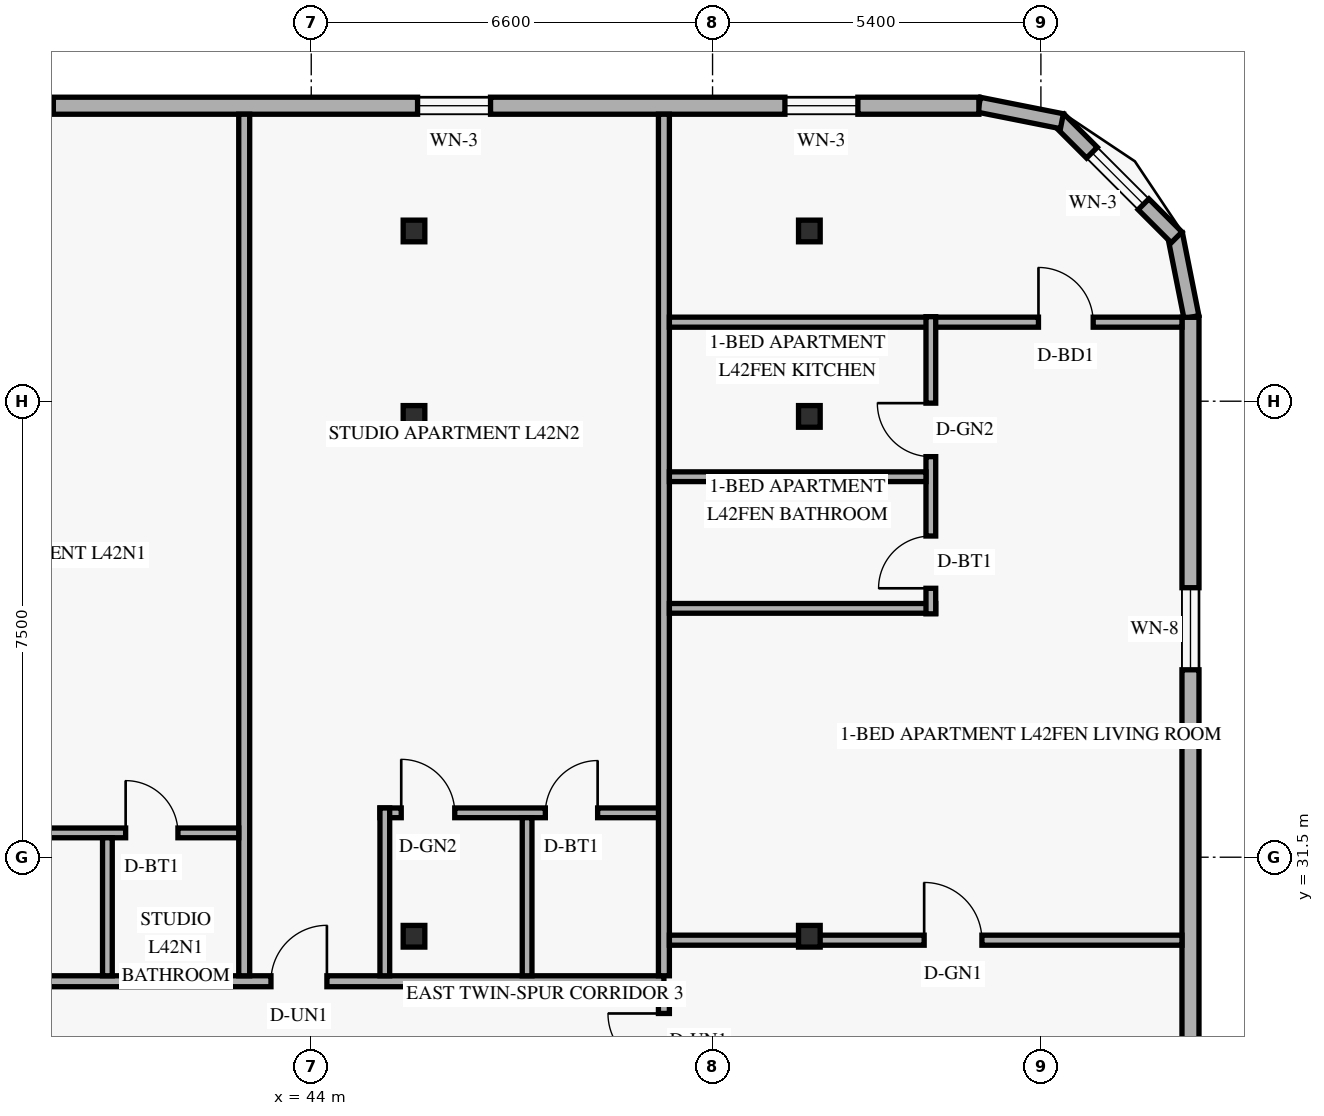
"""IFC4 building model, lengths in metres.
Left out: names, types, materials, properties, quantities, classifications, styles, units other than length and angle.
Written with IfcOpenShell. Run it as: python <this file> out.ifc"""

import sys

from ifc_helpers import new_model, si_unit, direction, frame, frame_2d, origin, origin_2d, place, context, subcontext, project, spatial, rectangle, hollow_rectangle, extrude, element, fill, save


model = new_model("IFC4")
c1 = context("Model", 3, precision=1e-05, world=origin(), true_north=direction((0.0, 1.0)))
c2 = subcontext(c1, "Body", "Model", "MODEL_VIEW")
j1 = project(units=[si_unit("LENGTHUNIT", "METRE"), si_unit("PLANEANGLEUNIT", "RADIAN")], contexts=[c1])
p1 = place(None, origin())
s1 = spatial("IfcSite", under=j1, at=p1, CompositionType="ELEMENT")
p2 = place(p1, origin())
s2 = spatial("IfcBuilding", under=s1, at=p2, CompositionType="ELEMENT")
p3 = place(p2, frame((0.0, 0.0, 162.6)))
s3 = spatial("IfcBuildingStorey", under=s2, at=p3, CompositionType="ELEMENT", Elevation=162.6)
for number, where, z_axis, x_axis in (
    (1, (45.627, 30.2, 0.0), (0.035, 0.0, 0.999), (0.0, 1.0, 0.0)),
    (2, (45.627, 38.75, 0.0), (0.035, 0.0, 0.999), (0.0, 1.0, 0.0)),
    (3, (45.627, 41.8, 0.0), (0.035, 0.0, 0.999), (0.0, 1.0, 0.0)),
):
    element("IfcColumn", number, at=place(p3, frame(where, z_axis=z_axis, x_axis=x_axis)), inside=s3, PredefinedType="COLUMN", context=c2, shape_type="SweptSolid", body=[
        extrude(hollow_rectangle(XDim=0.356, YDim=0.356, WallThickness=0.016, at=origin_2d()), origin(), (0.0, 0.0, 1.0), 3.602),
    ])
for number, where, z_axis, x_axis in (
    (4, (52.088, 30.2, 0.0), (0.058, 0.0, 0.998), (0.0, 1.0, 0.0)),
    (5, (52.088, 38.75, 0.0), (0.058, 0.0, 0.998), (0.0, 1.0, 0.0)),
    (6, (52.088, 41.8, 0.0), (0.058, 0.0, 0.998), (0.0, 1.0, 0.0)),
):
    element("IfcColumn", number, at=place(p3, frame(where, z_axis=z_axis, x_axis=x_axis)), inside=s3, PredefinedType="COLUMN", context=c2, shape_type="SweptSolid", body=[
        extrude(hollow_rectangle(XDim=0.356, YDim=0.356, WallThickness=0.016, at=origin_2d()), origin(), (0.0, 0.0, 1.0), 3.606),
    ])
p4 = place(p3, frame((58.476, 40.384, 0.0), z_axis=(0.0, 0.0, 1.0), x_axis=(-0.19496651342, 0.980809899341, 0.0)))
e7 = element("IfcWall", 7, at=p4, inside=s3, PredefinedType="SOLIDWALL", context=c2, shape_type="SweptSolid", body=[
    extrude(rectangle(XDim=1.389, YDim=0.25, at=frame_2d((0.694, 0.0))), origin(), (0.0, 0.0, 1.0), 3.36),
])
p5 = place(p3, frame((58.232, 41.695, 0.0), z_axis=(0.0, 0.0, 1.0), x_axis=(-0.707106781187, 0.707106781187, 0.0)))
e8 = element("IfcWall", 8, at=p5, inside=s3, PredefinedType="SOLIDWALL", context=c2, shape_type="SweptSolid", body=[
    extrude(rectangle(XDim=2.739, YDim=0.25, at=frame_2d((1.37, 0.0))), origin(), (0.0, 0.0, 1.0), 3.36),
])
p6 = place(p5, frame((0.77, 0.0, 0.85)))
e9 = element("IfcOpeningElement", 9, at=p6, cuts=e8, PredefinedType="OPENING", context=c2, shape_type="SweptSolid", body=[
    extrude(rectangle(XDim=1.2, YDim=1.5, at=frame_2d((0.6, 0.75))), frame((0.0, 0.135, 0.0), z_axis=(0.0, -1.0, 0.0), x_axis=(1.0, 0.0, 0.0)), (0.0, 0.0, 1.0), 0.27),
])
p7 = place(p3, frame((56.345, 43.605, 0.0), z_axis=(0.0, 0.0, 1.0), x_axis=(-0.980809899341, 0.19496651342, 0.0)))
e10 = element("IfcWall", 10, at=p7, inside=s3, PredefinedType="SOLIDWALL", context=c2, shape_type="SweptSolid", body=[
    extrude(rectangle(XDim=1.389, YDim=0.25, at=frame_2d((0.694, 0.0))), origin(), (0.0, 0.0, 1.0), 3.36),
])
p8 = place(p3, frame((58.46, 7.62, 0.0), z_axis=(0.0, 0.0, 1.0), x_axis=(0.0, 1.0, 0.0)))
e11 = element("IfcWall", 11, at=p8, inside=s3, PredefinedType="SOLIDWALL", context=c2, shape_type="SweptSolid", body=[
    extrude(rectangle(XDim=32.76, YDim=0.28, at=frame_2d((16.38, 0.0))), origin(), (0.0, 0.0, 1.0), 3.36),
])
p9 = place(p8, frame((4.44, 0.0, 0.85)))
e12 = element("IfcOpeningElement", 12, at=p9, cuts=e11, PredefinedType="OPENING", context=c2, shape_type="SweptSolid", body=[
    extrude(rectangle(XDim=1.35, YDim=1.55, at=frame_2d((0.675, 0.775))), frame((0.0, 0.15, 0.0), z_axis=(0.0, -1.0, 0.0), x_axis=(1.0, 0.0, 0.0)), (0.0, 0.0, 1.0), 0.3),
])
p10 = place(p8, frame((12.23, 0.0, 0.85)))
e13 = element("IfcOpeningElement", 13, at=p10, cuts=e11, PredefinedType="OPENING", context=c2, shape_type="SweptSolid", body=[
    extrude(rectangle(XDim=1.35, YDim=1.55, at=frame_2d((0.675, 0.775))), frame((0.0, 0.15, 0.0), z_axis=(0.0, -1.0, 0.0), x_axis=(1.0, 0.0, 0.0)), (0.0, 0.0, 1.0), 0.3),
])
p11 = place(p8, frame((18.373, 0.0, 0.85)))
e14 = element("IfcOpeningElement", 14, at=p11, cuts=e11, PredefinedType="OPENING", context=c2, shape_type="SweptSolid", body=[
    extrude(rectangle(XDim=1.35, YDim=1.55, at=frame_2d((0.675, 0.775))), frame((0.0, 0.15, 0.0), z_axis=(0.0, -1.0, 0.0), x_axis=(1.0, 0.0, 0.0)), (0.0, 0.0, 1.0), 0.3),
])
p12 = place(p8, frame((26.963, 0.0, 0.85)))
e15 = element("IfcOpeningElement", 15, at=p12, cuts=e11, PredefinedType="OPENING", context=c2, shape_type="SweptSolid", body=[
    extrude(rectangle(XDim=1.35, YDim=1.55, at=frame_2d((0.675, 0.775))), frame((0.0, 0.15, 0.0), z_axis=(0.0, -1.0, 0.0), x_axis=(1.0, 0.0, 0.0)), (0.0, 0.0, 1.0), 0.3),
])
p13 = place(p3, frame((54.98, 43.86, 0.0), z_axis=(0.0, 0.0, 1.0), x_axis=(-1.0, 0.0, 0.0)))
e16 = element("IfcWall", 16, at=p13, inside=s3, PredefinedType="SOLIDWALL", context=c2, shape_type="SweptSolid", body=[
    extrude(rectangle(XDim=33.76, YDim=0.28, at=frame_2d((16.88, 0.0))), origin(), (0.0, 0.0, 1.0), 3.36),
])
p14 = place(p13, frame((28.78, 0.0, 0.85)))
e17 = element("IfcOpeningElement", 17, at=p14, cuts=e16, PredefinedType="OPENING", context=c2, shape_type="SweptSolid", body=[
    extrude(rectangle(XDim=1.2, YDim=1.5, at=frame_2d((0.6, 0.75))), frame((0.0, 0.15, 0.0), z_axis=(0.0, -1.0, 0.0), x_axis=(1.0, 0.0, 0.0)), (0.0, 0.0, 1.0), 0.3),
])
p15 = place(p13, frame((21.895, 0.0, 0.85)))
e18 = element("IfcOpeningElement", 18, at=p15, cuts=e16, PredefinedType="OPENING", context=c2, shape_type="SweptSolid", body=[
    extrude(rectangle(XDim=1.2, YDim=1.5, at=frame_2d((0.6, 0.75))), frame((0.0, 0.15, 0.0), z_axis=(0.0, -1.0, 0.0), x_axis=(1.0, 0.0, 0.0)), (0.0, 0.0, 1.0), 0.3),
])
p16 = place(p13, frame((15.221, 0.0, 0.85)))
e19 = element("IfcOpeningElement", 19, at=p16, cuts=e16, PredefinedType="OPENING", context=c2, shape_type="SweptSolid", body=[
    extrude(rectangle(XDim=1.2, YDim=1.5, at=frame_2d((0.6, 0.75))), frame((0.0, 0.15, 0.0), z_axis=(0.0, -1.0, 0.0), x_axis=(1.0, 0.0, 0.0)), (0.0, 0.0, 1.0), 0.3),
])
p17 = place(p13, frame((8.031, 0.0, 0.85)))
e20 = element("IfcOpeningElement", 20, at=p17, cuts=e16, PredefinedType="OPENING", context=c2, shape_type="SweptSolid", body=[
    extrude(rectangle(XDim=1.2, YDim=1.5, at=frame_2d((0.6, 0.75))), frame((0.0, 0.15, 0.0), z_axis=(0.0, -1.0, 0.0), x_axis=(1.0, 0.0, 0.0)), (0.0, 0.0, 1.0), 0.3),
])
p18 = place(p13, frame((1.99, 0.0, 0.85)))
e21 = element("IfcOpeningElement", 21, at=p18, cuts=e16, PredefinedType="OPENING", context=c2, shape_type="SweptSolid", body=[
    extrude(rectangle(XDim=1.2, YDim=1.5, at=frame_2d((0.6, 0.75))), frame((0.0, 0.15, 0.0), z_axis=(0.0, -1.0, 0.0), x_axis=(1.0, 0.0, 0.0)), (0.0, 0.0, 1.0), 0.3),
])
p19 = place(p3, frame((35.51, 29.46, 0.0), z_axis=(0.0, 0.0, 1.0), x_axis=(1.0, 0.0, 0.0)))
e22 = element("IfcWall", 22, at=p19, inside=s3, PredefinedType="STANDARD", context=c2, shape_type="SweptSolid", body=[
    extrude(rectangle(XDim=14.29, YDim=0.18, at=frame_2d((7.145, 0.0))), origin(), (0.0, 0.0, 1.0), 2.73),
])
p20 = place(p19, frame((0.35, 0.0, 0.0)))
e23 = element("IfcOpeningElement", 23, at=p20, cuts=e22, PredefinedType="OPENING", context=c2, shape_type="SweptSolid", body=[
    extrude(rectangle(XDim=0.92, YDim=2.15, at=frame_2d((0.46, 1.075))), frame((0.0, 0.1, 0.0), z_axis=(0.0, -1.0, 0.0), x_axis=(1.0, 0.0, 0.0)), (0.0, 0.0, 1.0), 0.2),
])
p21 = place(p19, frame((7.828, 0.0, 0.0)))
e24 = element("IfcOpeningElement", 24, at=p21, cuts=e22, PredefinedType="OPENING", context=c2, shape_type="SweptSolid", body=[
    extrude(rectangle(XDim=0.92, YDim=2.15, at=frame_2d((0.46, 1.075))), frame((0.0, 0.1, 0.0), z_axis=(0.0, -1.0, 0.0), x_axis=(1.0, 0.0, 0.0)), (0.0, 0.0, 1.0), 0.2),
])
p22 = place(p3, frame((42.898, 29.55, 0.0), z_axis=(0.0, 0.0, 1.0), x_axis=(0.0, 1.0, 0.0)))
e25 = element("IfcWall", 25, at=p22, inside=s3, PredefinedType="PARTITIONING", context=c2, shape_type="SweptSolid", body=[
    extrude(rectangle(XDim=14.17, YDim=0.18, at=frame_2d((7.085, 0.0))), origin(), (0.0, 0.0, 1.0), 2.73),
])
p23 = place(p3, frame((38.228, 31.9, 0.0), z_axis=(0.0, 0.0, 1.0), x_axis=(1.0, 0.0, 0.0)))
e26 = element("IfcWall", 26, at=p23, inside=s3, PredefinedType="PLUMBINGWALL", context=c2, shape_type="SweptSolid", body=[
    extrude(rectangle(XDim=4.58, YDim=0.16, at=frame_2d((2.29, 0.0))), origin(), (0.0, 0.0, 1.0), 3.36),
])
p24 = place(p23, frame((0.35, 0.0, 0.0)))
e27 = element("IfcOpeningElement", 27, at=p24, cuts=e26, PredefinedType="OPENING", context=c2, shape_type="SweptSolid", body=[
    extrude(rectangle(XDim=0.88, YDim=2.12, at=frame_2d((0.44, 1.06))), frame((0.0, 0.09, 0.0), z_axis=(0.0, -1.0, 0.0), x_axis=(1.0, 0.0, 0.0)), (0.0, 0.0, 1.0), 0.18),
])
p25 = place(p23, frame((2.72, 0.0, 0.0)))
e28 = element("IfcOpeningElement", 28, at=p25, cuts=e26, PredefinedType="OPENING", context=c2, shape_type="SweptSolid", body=[
    extrude(rectangle(XDim=0.86, YDim=2.12, at=frame_2d((0.43, 1.06))), frame((0.0, 0.09, 0.0), z_axis=(0.0, -1.0, 0.0), x_axis=(1.0, 0.0, 0.0)), (0.0, 0.0, 1.0), 0.18),
])
p26 = place(p3, frame((40.648, 29.55, 0.0), z_axis=(0.0, 0.0, 1.0), x_axis=(0.0, 1.0, 0.0)))
e29 = element("IfcWall", 29, at=p26, inside=s3, PredefinedType="PLUMBINGWALL", context=c2, shape_type="SweptSolid", body=[
    extrude(rectangle(XDim=2.27, YDim=0.16, at=frame_2d((1.135, 0.0))), origin(), (0.0, 0.0, 1.0), 2.73),
])
p27 = place(p3, frame((45.13, 32.23, 0.0), z_axis=(0.0, 0.0, 1.0), x_axis=(1.0, 0.0, 0.0)))
e30 = element("IfcWall", 30, at=p27, inside=s3, PredefinedType="PLUMBINGWALL", context=c2, shape_type="SweptSolid", body=[
    extrude(rectangle(XDim=4.67, YDim=0.16, at=frame_2d((2.335, 0.0))), origin(), (0.0, 0.0, 1.0), 2.73),
])
p28 = place(p27, frame((0.35, 0.0, 0.0)))
e31 = element("IfcOpeningElement", 31, at=p28, cuts=e30, PredefinedType="OPENING", context=c2, shape_type="SweptSolid", body=[
    extrude(rectangle(XDim=0.88, YDim=2.12, at=frame_2d((0.44, 1.06))), frame((0.0, 0.09, 0.0), z_axis=(0.0, -1.0, 0.0), x_axis=(1.0, 0.0, 0.0)), (0.0, 0.0, 1.0), 0.18),
])
p29 = place(p27, frame((2.72, 0.0, 0.0)))
e32 = element("IfcOpeningElement", 32, at=p29, cuts=e30, PredefinedType="OPENING", context=c2, shape_type="SweptSolid", body=[
    extrude(rectangle(XDim=0.86, YDim=2.12, at=frame_2d((0.43, 1.06))), frame((0.0, 0.09, 0.0), z_axis=(0.0, -1.0, 0.0), x_axis=(1.0, 0.0, 0.0)), (0.0, 0.0, 1.0), 0.18),
])
p30 = place(p3, frame((45.21, 29.55, 0.0), z_axis=(0.0, 0.0, 1.0), x_axis=(0.0, 1.0, 0.0)))
e33 = element("IfcWall", 33, at=p30, inside=s3, PredefinedType="PLUMBINGWALL", context=c2, shape_type="SweptSolid", body=[
    extrude(rectangle(XDim=2.76, YDim=0.16, at=frame_2d((1.38, 0.0))), origin(), (0.0, 0.0, 1.0), 2.73),
])
p31 = place(p3, frame((47.55, 29.55, 0.0), z_axis=(0.0, 0.0, 1.0), x_axis=(0.0, 1.0, 0.0)))
e34 = element("IfcWall", 34, at=p31, inside=s3, PredefinedType="PLUMBINGWALL", context=c2, shape_type="SweptSolid", body=[
    extrude(rectangle(XDim=2.6, YDim=0.16, at=frame_2d((1.3, 0.0))), origin(), (0.0, 0.0, 1.0), 2.73),
])
p32 = place(p3, frame((49.8, 27.65, 0.0), z_axis=(0.0, 0.0, 1.0), x_axis=(0.0, 1.0, 0.0)))
e35 = element("IfcWall", 35, at=p32, inside=s3, PredefinedType="STANDARD", context=c2, shape_type="SweptSolid", body=[
    extrude(rectangle(XDim=1.72, YDim=0.18, at=frame_2d((0.86, 0.0))), origin(), (0.0, 0.0, 1.0), 3.36),
])
p33 = place(p32, frame((0.36, 0.0, 0.0)))
e36 = element("IfcOpeningElement", 36, at=p33, cuts=e35, PredefinedType="OPENING", context=c2, shape_type="SweptSolid", body=[
    extrude(rectangle(XDim=0.92, YDim=2.15, at=frame_2d((0.46, 1.075))), frame((0.0, 0.1, 0.0), z_axis=(0.0, -1.0, 0.0), x_axis=(1.0, 0.0, 0.0)), (0.0, 0.0, 1.0), 0.2),
])
p34 = place(p3, frame((49.8, 29.55, 0.0), z_axis=(0.0, 0.0, 1.0), x_axis=(0.0, 1.0, 0.0)))
e37 = element("IfcWall", 37, at=p34, inside=s3, PredefinedType="PARTITIONING", context=c2, shape_type="SweptSolid", body=[
    extrude(rectangle(XDim=14.17, YDim=0.18, at=frame_2d((7.085, 0.0))), origin(), (0.0, 0.0, 1.0), 2.73),
])
p35 = place(p3, frame((49.89, 40.3, 0.0), z_axis=(0.0, 0.0, 1.0), x_axis=(1.0, 0.0, 0.0)))
e38 = element("IfcWall", 38, at=p35, inside=s3, PredefinedType="PARTITIONING", context=c2, shape_type="SweptSolid", body=[
    extrude(rectangle(XDim=8.43, YDim=0.165, at=frame_2d((4.215, 0.0))), origin(), (0.0, 0.0, 1.0), 2.879),
])
p36 = place(p35, frame((6.07, 0.0, 0.0)))
e39 = element("IfcOpeningElement", 39, at=p36, cuts=e38, PredefinedType="OPENING", context=c2, shape_type="SweptSolid", body=[
    extrude(rectangle(XDim=0.9, YDim=2.14, at=frame_2d((0.45, 1.07))), frame((0.0, 0.093, 0.0), z_axis=(0.0, -1.0, 0.0), x_axis=(1.0, 0.0, 0.0)), (0.0, 0.0, 1.0), 0.185),
])
p37 = place(p3, frame((49.89, 35.593, 0.0), z_axis=(0.0, 0.0, 1.0), x_axis=(1.0, 0.0, 0.0)))
e40 = element("IfcWall", 40, at=p37, inside=s3, PredefinedType="PLUMBINGWALL", context=c2, shape_type="SweptSolid", body=[
    extrude(rectangle(XDim=4.38, YDim=0.16, at=frame_2d((2.19, 0.0))), origin(), (0.0, 0.0, 1.0), 2.879),
])
p38 = place(p3, frame((54.19, 35.503, 0.0), z_axis=(0.0, 0.0, 1.0), x_axis=(0.0, 1.0, 0.0)))
e41 = element("IfcWall", 41, at=p38, inside=s3, PredefinedType="PLUMBINGWALL", context=c2, shape_type="SweptSolid", body=[
    extrude(rectangle(XDim=4.887, YDim=0.16, at=frame_2d((2.443, 0.0))), origin(), (0.0, 0.0, 1.0), 3.36),
])
p39 = place(p38, frame((0.42, 0.0, 0.0)))
e42 = element("IfcOpeningElement", 42, at=p39, cuts=e41, PredefinedType="OPENING", context=c2, shape_type="SweptSolid", body=[
    extrude(rectangle(XDim=0.86, YDim=2.12, at=frame_2d((0.43, 1.06))), frame((0.0, 0.09, 0.0), z_axis=(0.0, -1.0, 0.0), x_axis=(1.0, 0.0, 0.0)), (0.0, 0.0, 1.0), 0.18),
])
p40 = place(p38, frame((2.585, 0.0, 0.0)))
e43 = element("IfcOpeningElement", 43, at=p40, cuts=e41, PredefinedType="OPENING", context=c2, shape_type="SweptSolid", body=[
    extrude(rectangle(XDim=0.88, YDim=2.12, at=frame_2d((0.44, 1.06))), frame((0.0, 0.09, 0.0), z_axis=(0.0, -1.0, 0.0), x_axis=(1.0, 0.0, 0.0)), (0.0, 0.0, 1.0), 0.18),
])
p41 = place(p3, frame((49.89, 37.758, 0.0), z_axis=(0.0, 0.0, 1.0), x_axis=(1.0, 0.0, 0.0)))
e44 = element("IfcWall", 44, at=p41, inside=s3, PredefinedType="PLUMBINGWALL", context=c2, shape_type="SweptSolid", body=[
    extrude(rectangle(XDim=4.22, YDim=0.16, at=frame_2d((2.11, 0.0))), origin(), (0.0, 0.0, 1.0), 2.879),
])
p42 = place(p3, frame((49.89, 30.135, 0.0), z_axis=(0.0, 0.0, 1.0), x_axis=(1.0, 0.0, 0.0)))
e45 = element("IfcWall", 45, at=p42, inside=s3, PredefinedType="PARTITIONING", context=c2, shape_type="SweptSolid", body=[
    extrude(rectangle(XDim=8.43, YDim=0.165, at=frame_2d((4.215, 0.0))), origin(), (0.0, 0.0, 1.0), 2.73),
])
p43 = place(p42, frame((4.19, 0.0, 0.0)))
e46 = element("IfcOpeningElement", 46, at=p43, cuts=e45, PredefinedType="OPENING", context=c2, shape_type="SweptSolid", body=[
    extrude(rectangle(XDim=0.95, YDim=2.15, at=frame_2d((0.475, 1.075))), frame((0.0, 0.093, 0.0), z_axis=(0.0, -1.0, 0.0), x_axis=(1.0, 0.0, 0.0)), (0.0, 0.0, 1.0), 0.185),
])
p44 = place(p6, origin())
e47 = element("IfcWindow", 47, at=p44, inside=s3, PartitioningType="SINGLE_PANEL", PredefinedType="WINDOW", context=c2, shape_type="SweptSolid", body=[
    extrude(rectangle(XDim=1.2, YDim=1.5, at=frame_2d((0.6, 0.75))), frame((0.0, 0.03, 0.0), z_axis=(0.0, -1.0, 0.0), x_axis=(1.0, 0.0, 0.0)), (0.0, 0.0, 1.0), 0.06),
])
fill(e9, e47)
p45 = place(p12, origin())
e48 = element("IfcWindow", 48, at=p45, inside=s3, PartitioningType="SINGLE_PANEL", PredefinedType="WINDOW", context=c2, shape_type="SweptSolid", body=[
    extrude(rectangle(XDim=1.35, YDim=1.55, at=frame_2d((0.675, 0.775))), frame((0.0, 0.03, 0.0), z_axis=(0.0, -1.0, 0.0), x_axis=(1.0, 0.0, 0.0)), (0.0, 0.0, 1.0), 0.06),
])
fill(e15, e48)
p46 = place(p16, origin())
e49 = element("IfcWindow", 49, at=p46, inside=s3, PartitioningType="SINGLE_PANEL", PredefinedType="WINDOW", context=c2, shape_type="SweptSolid", body=[
    extrude(rectangle(XDim=1.2, YDim=1.5, at=frame_2d((0.6, 0.75))), frame((0.0, 0.03, 0.0), z_axis=(0.0, -1.0, 0.0), x_axis=(1.0, 0.0, 0.0)), (0.0, 0.0, 1.0), 0.06),
])
fill(e19, e49)
p47 = place(p17, origin())
e50 = element("IfcWindow", 50, at=p47, inside=s3, PartitioningType="SINGLE_PANEL", PredefinedType="WINDOW", context=c2, shape_type="SweptSolid", body=[
    extrude(rectangle(XDim=1.2, YDim=1.5, at=frame_2d((0.6, 0.75))), frame((0.0, 0.03, 0.0), z_axis=(0.0, -1.0, 0.0), x_axis=(1.0, 0.0, 0.0)), (0.0, 0.0, 1.0), 0.06),
])
fill(e20, e50)
p48 = place(p18, origin())
e51 = element("IfcWindow", 51, at=p48, inside=s3, PartitioningType="SINGLE_PANEL", PredefinedType="WINDOW", context=c2, shape_type="SweptSolid", body=[
    extrude(rectangle(XDim=1.2, YDim=1.5, at=frame_2d((0.6, 0.75))), frame((0.0, 0.03, 0.0), z_axis=(0.0, -1.0, 0.0), x_axis=(1.0, 0.0, 0.0)), (0.0, 0.0, 1.0), 0.06),
])
fill(e21, e51)
p49 = place(p25, origin())
e52 = element("IfcDoor", 52, at=p49, inside=s3, OperationType="SINGLE_SWING_LEFT", PredefinedType="DOOR", context=c2, shape_type="SweptSolid", body=[
    extrude(rectangle(XDim=0.86, YDim=2.12, at=frame_2d((0.43, 1.06))), frame((0.0, 0.025, 0.0), z_axis=(0.0, -1.0, 0.0), x_axis=(1.0, 0.0, 0.0)), (0.0, 0.0, 1.0), 0.05),
])
fill(e28, e52)
p50 = place(p21, origin())
e53 = element("IfcDoor", 53, at=p50, inside=s3, OperationType="SINGLE_SWING_RIGHT", PredefinedType="DOOR", context=c2, shape_type="SweptSolid", body=[
    extrude(rectangle(XDim=0.92, YDim=2.15, at=frame_2d((0.46, 1.075))), frame((0.0, 0.025, 0.0), z_axis=(0.0, -1.0, 0.0), x_axis=(1.0, 0.0, 0.0)), (0.0, 0.0, 1.0), 0.05),
])
fill(e24, e53)
p51 = place(p28, origin())
e54 = element("IfcDoor", 54, at=p51, inside=s3, OperationType="SINGLE_SWING_LEFT", PredefinedType="DOOR", context=c2, shape_type="SweptSolid", body=[
    extrude(rectangle(XDim=0.88, YDim=2.12, at=frame_2d((0.44, 1.06))), frame((0.0, 0.025, 0.0), z_axis=(0.0, -1.0, 0.0), x_axis=(1.0, 0.0, 0.0)), (0.0, 0.0, 1.0), 0.05),
])
fill(e31, e54)
p52 = place(p29, origin())
e55 = element("IfcDoor", 55, at=p52, inside=s3, OperationType="SINGLE_SWING_RIGHT", PredefinedType="DOOR", context=c2, shape_type="SweptSolid", body=[
    extrude(rectangle(XDim=0.86, YDim=2.12, at=frame_2d((0.43, 1.06))), frame((0.0, 0.025, 0.0), z_axis=(0.0, -1.0, 0.0), x_axis=(1.0, 0.0, 0.0)), (0.0, 0.0, 1.0), 0.05),
])
fill(e32, e55)
p53 = place(p43, origin())
e56 = element("IfcDoor", 56, at=p53, inside=s3, OperationType="SINGLE_SWING_LEFT", PredefinedType="DOOR", context=c2, shape_type="SweptSolid", body=[
    extrude(rectangle(XDim=0.95, YDim=2.15, at=frame_2d((0.475, 1.075))), frame((0.0, 0.025, 0.0), z_axis=(0.0, -1.0, 0.0), x_axis=(1.0, 0.0, 0.0)), (0.0, 0.0, 1.0), 0.05),
])
fill(e46, e56)
p54 = place(p33, origin())
e57 = element("IfcDoor", 57, at=p54, inside=s3, OperationType="SINGLE_SWING_RIGHT", PredefinedType="DOOR", context=c2, shape_type="SweptSolid", body=[
    extrude(rectangle(XDim=0.92, YDim=2.15, at=frame_2d((0.46, 1.075))), frame((0.0, 0.025, 0.0), z_axis=(0.0, -1.0, 0.0), x_axis=(1.0, 0.0, 0.0)), (0.0, 0.0, 1.0), 0.05),
])
fill(e36, e57)
p55 = place(p39, origin())
e58 = element("IfcDoor", 58, at=p55, inside=s3, OperationType="SINGLE_SWING_LEFT", PredefinedType="DOOR", context=c2, shape_type="SweptSolid", body=[
    extrude(rectangle(XDim=0.86, YDim=2.12, at=frame_2d((0.43, 1.06))), frame((0.0, 0.025, 0.0), z_axis=(0.0, -1.0, 0.0), x_axis=(1.0, 0.0, 0.0)), (0.0, 0.0, 1.0), 0.05),
])
fill(e42, e58)
p56 = place(p40, origin())
e59 = element("IfcDoor", 59, at=p56, inside=s3, OperationType="SINGLE_SWING_RIGHT", PredefinedType="DOOR", context=c2, shape_type="SweptSolid", body=[
    extrude(rectangle(XDim=0.88, YDim=2.12, at=frame_2d((0.44, 1.06))), frame((0.0, 0.025, 0.0), z_axis=(0.0, -1.0, 0.0), x_axis=(1.0, 0.0, 0.0)), (0.0, 0.0, 1.0), 0.05),
])
fill(e43, e59)
p57 = place(p36, origin())
e60 = element("IfcDoor", 60, at=p57, inside=s3, OperationType="SINGLE_SWING_LEFT", PredefinedType="DOOR", context=c2, shape_type="SweptSolid", body=[
    extrude(rectangle(XDim=0.9, YDim=2.14, at=frame_2d((0.45, 1.07))), frame((0.0, 0.025, 0.0), z_axis=(0.0, -1.0, 0.0), x_axis=(1.0, 0.0, 0.0)), (0.0, 0.0, 1.0), 0.05),
])
fill(e39, e60)
save(model, sys.argv[1])
